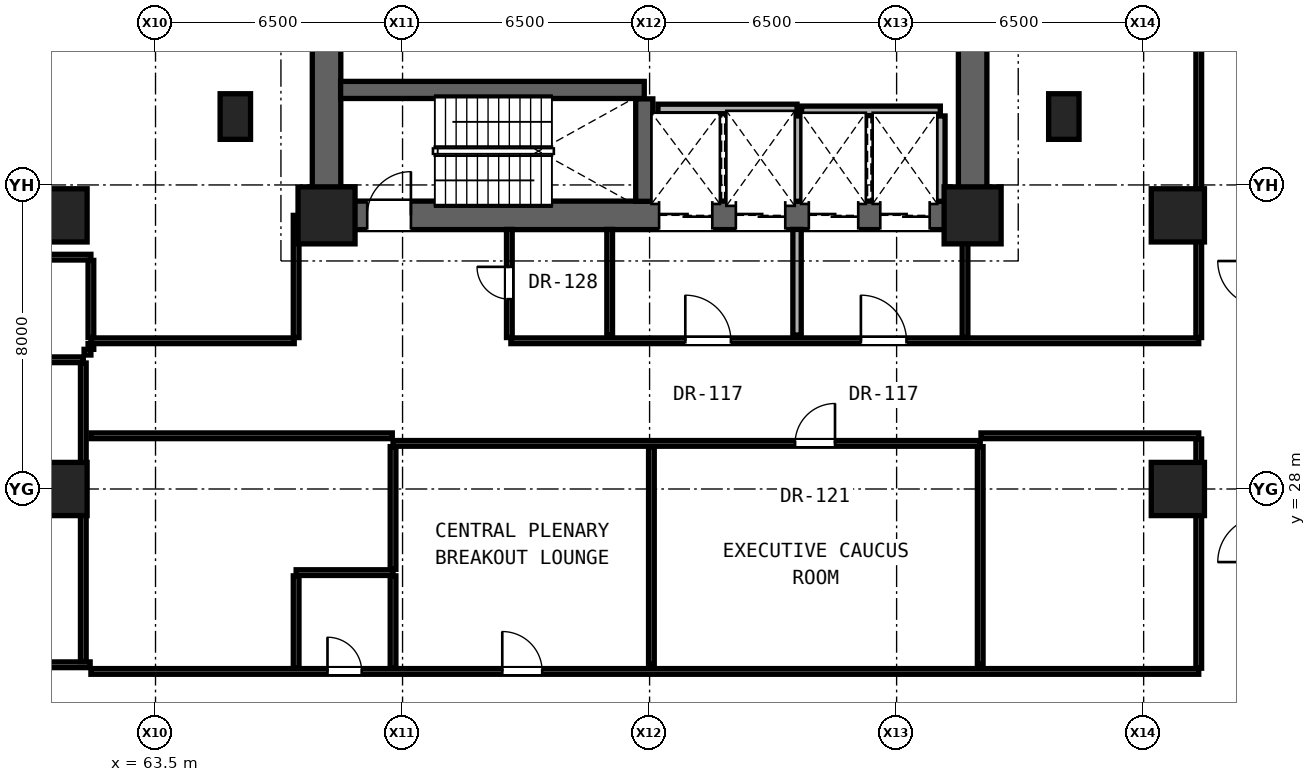
"""IFC4 building model, lengths in metres.
Left out: names, types, materials, properties, quantities, classifications, styles, units other than length and angle.
Written with IfcOpenShell. Run it as: python <this file> out.ifc"""

import sys

from ifc_helpers import new_model, si_unit, direction, frame, frame_2d, origin, origin_2d, place, context, subcontext, project, spatial, rectangle, hollow_rectangle, extrude, element, fill, save


model = new_model("IFC4")
c1 = context("Model", 3, precision=1e-05, world=origin(), true_north=direction((0.0, 1.0)))
c2 = subcontext(c1, "Body", "Model", "MODEL_VIEW")
j1 = project(units=[si_unit("LENGTHUNIT", "METRE"), si_unit("PLANEANGLEUNIT", "RADIAN")], contexts=[c1])
p1 = place(None, origin())
s1 = spatial("IfcSite", under=j1, at=p1, CompositionType="ELEMENT")
p2 = place(p1, origin())
s2 = spatial("IfcBuilding", under=s1, at=p2, CompositionType="ELEMENT")
p3 = place(p2, frame((0.0, 0.0, 13.8)))
s3 = spatial("IfcBuildingStorey", under=s2, at=p3, CompositionType="ELEMENT", Elevation=13.8)
for number, where, z_axis, x_axis in (
    (1, (68.0, 35.2, 0.0), (0.0, 0.0, 1.0), (1.0, 0.0, 0.0)),
    (2, (85.0, 35.2, 0.0), (0.0, 0.0, 1.0), (1.0, 0.0, 0.0)),
):
    element("IfcColumn", number, at=place(p3, frame(where, z_axis=z_axis, x_axis=x_axis)), inside=s3, PredefinedType="COLUMN", context=c2, shape_type="SweptSolid", body=[
        extrude(rectangle(XDim=1.5, YDim=1.5, at=origin_2d()), origin(), (0.0, 0.0, 1.0), 4.3),
    ])
for number, where, z_axis, x_axis in (
    (3, (61.0, 28.0, 0.0), (0.0, 0.0, 1.0), (1.0, 0.0, 0.0)),
    (4, (61.0, 35.2, 0.0), (0.0, 0.0, 1.0), (1.0, 0.0, 0.0)),
    (5, (90.4, 28.0, 0.0), (0.0, 0.0, 1.0), (1.0, 0.0, 0.0)),
    (6, (90.4, 35.2, 0.0), (0.0, 0.0, 1.0), (1.0, 0.0, 0.0)),
):
    element("IfcColumn", number, at=place(p3, frame(where, z_axis=z_axis, x_axis=x_axis)), inside=s3, PredefinedType="COLUMN", context=c2, shape_type="SweptSolid", body=[
        extrude(hollow_rectangle(XDim=1.4, YDim=1.4, WallThickness=0.08, at=origin_2d()), origin(), (0.0, 0.0, 1.0), 4.3),
    ])
for number, where, z_axis, x_axis in (
    (7, (65.6, 37.8, 0.0), (0.0, 0.0, 1.0), (1.0, 0.0, 0.0)),
    (8, (87.4, 37.8, 0.0), (0.0, 0.0, 1.0), (1.0, 0.0, 0.0)),
):
    element("IfcColumn", number, at=place(p3, frame(where, z_axis=z_axis, x_axis=x_axis)), inside=s3, PredefinedType="PILASTER", context=c2, shape_type="SweptSolid", body=[
        extrude(rectangle(XDim=0.8, YDim=1.2, at=origin_2d()), origin(), (0.0, 0.0, 1.0), 4.3),
    ])
for number, where, z_axis, x_axis in (
    (9, (68.0, 35.2, 0.0), (0.0, 0.0, 1.0), (0.0, 1.0, 0.0)),
    (10, (85.0, 35.2, 0.0), (0.0, 0.0, 1.0), (0.0, 1.0, 0.0)),
):
    element("IfcWall", number, at=place(p3, frame(where, z_axis=z_axis, x_axis=x_axis)), inside=s3, PredefinedType="SHEAR", context=c2, shape_type="SweptSolid", body=[
        extrude(rectangle(XDim=5.6, YDim=0.75, at=frame_2d((2.8, 0.0))), origin(), (0.0, 0.0, 1.0), 3.65),
    ])
p4 = place(p3, frame((68.0, 35.2, 0.0), z_axis=(0.0, 0.0, 1.0), x_axis=(1.0, 0.0, 0.0)))
e11 = element("IfcWall", 11, at=p4, inside=s3, PredefinedType="SHEAR", context=c2, shape_type="SweptSolid", body=[
    extrude(rectangle(XDim=17.0, YDim=0.75, at=frame_2d((8.5, 0.0))), origin(), (0.0, 0.0, 1.0), 3.65),
])
p5 = place(p4, frame((1.07, 0.0, 0.0)))
e12 = element("IfcOpeningElement", 12, at=p5, cuts=e11, PredefinedType="OPENING", context=c2, shape_type="SweptSolid", body=[
    extrude(rectangle(XDim=1.15, YDim=2.2, at=frame_2d((0.575, 1.1))), frame((0.0, 0.385, 0.0), z_axis=(0.0, -1.0, 0.0), x_axis=(1.0, 0.0, 0.0)), (0.0, 0.0, 1.0), 0.77),
])
p6 = place(p4, frame((8.75, 0.0, 0.0)))
e13 = element("IfcOpeningElement", 13, at=p6, cuts=e11, PredefinedType="OPENING", context=c2, shape_type="SweptSolid", body=[
    extrude(rectangle(XDim=1.4, YDim=2.35, at=frame_2d((0.7, 1.175))), frame((0.0, 0.385, 0.0), z_axis=(0.0, -1.0, 0.0), x_axis=(1.0, 0.0, 0.0)), (0.0, 0.0, 1.0), 0.77),
])
p7 = place(p4, frame((10.77, 0.0, 0.0)))
e14 = element("IfcOpeningElement", 14, at=p7, cuts=e11, PredefinedType="OPENING", context=c2, shape_type="SweptSolid", body=[
    extrude(rectangle(XDim=1.3, YDim=2.3, at=frame_2d((0.65, 1.15))), frame((0.0, 0.385, 0.0), z_axis=(0.0, -1.0, 0.0), x_axis=(1.0, 0.0, 0.0)), (0.0, 0.0, 1.0), 0.77),
])
p8 = place(p4, frame((12.69, 0.0, 0.0)))
e15 = element("IfcOpeningElement", 15, at=p8, cuts=e11, PredefinedType="OPENING", context=c2, shape_type="SweptSolid", body=[
    extrude(rectangle(XDim=1.3, YDim=2.3, at=frame_2d((0.65, 1.15))), frame((0.0, 0.385, 0.0), z_axis=(0.0, -1.0, 0.0), x_axis=(1.0, 0.0, 0.0)), (0.0, 0.0, 1.0), 0.77),
])
p9 = place(p4, frame((14.57, 0.0, 0.0)))
e16 = element("IfcOpeningElement", 16, at=p9, cuts=e11, PredefinedType="OPENING", context=c2, shape_type="SweptSolid", body=[
    extrude(rectangle(XDim=1.3, YDim=2.3, at=frame_2d((0.65, 1.15))), frame((0.0, 0.385, 0.0), z_axis=(0.0, -1.0, 0.0), x_axis=(1.0, 0.0, 0.0)), (0.0, 0.0, 1.0), 0.77),
])
p10 = place(p3, frame((61.8, 23.2, 0.0), z_axis=(0.0, 0.0, 1.0), x_axis=(1.0, 0.0, 0.0)))
e17 = element("IfcWall", 17, at=p10, inside=s3, PredefinedType="PARTITIONING", context=c2, shape_type="SweptSolid", body=[
    extrude(rectangle(XDim=29.15, YDim=0.15, at=frame_2d((14.575, 0.0))), origin(), (0.0, 0.0, 1.0), 2.715),
])
p11 = place(p10, frame((6.225, 0.0, 0.0)))
e18 = element("IfcOpeningElement", 18, at=p11, cuts=e17, PredefinedType="OPENING", context=c2, shape_type="SweptSolid", body=[
    extrude(rectangle(XDim=0.9, YDim=2.1, at=frame_2d((0.45, 1.05))), frame((0.0, 0.085, 0.0), z_axis=(0.0, -1.0, 0.0), x_axis=(1.0, 0.0, 0.0)), (0.0, 0.0, 1.0), 0.17),
])
p12 = place(p10, frame((10.824, 0.0, 0.0)))
e19 = element("IfcOpeningElement", 19, at=p12, cuts=e17, PredefinedType="OPENING", context=c2, shape_type="SweptSolid", body=[
    extrude(rectangle(XDim=1.05, YDim=2.2, at=frame_2d((0.525, 1.1))), frame((0.0, 0.085, 0.0), z_axis=(0.0, -1.0, 0.0), x_axis=(1.0, 0.0, 0.0)), (0.0, 0.0, 1.0), 0.17),
])
p13 = place(p3, frame((42.65, 23.375, 0.0), z_axis=(0.0, 0.0, 1.0), x_axis=(1.0, 0.0, 0.0)))
e20 = element("IfcWall", 20, at=p13, inside=s3, PredefinedType="PARTITIONING", context=c2, shape_type="SweptSolid", body=[
    extrude(rectangle(XDim=19.13, YDim=0.15, at=frame_2d((9.565, 0.0))), origin(), (0.0, 0.0, 1.0), 2.602),
])
p14 = place(p3, frame((67.2, 25.8, 0.0), z_axis=(0.0, 0.0, 1.0), x_axis=(1.0, 0.0, 0.0)))
e21 = element("IfcWall", 21, at=p14, inside=s3, PredefinedType="PARTITIONING", context=c2, shape_type="SweptSolid", body=[
    extrude(rectangle(XDim=2.55, YDim=0.15, at=frame_2d((1.275, 0.0))), origin(), (0.0, 0.0, 1.0), 2.715),
])
p15 = place(p3, frame((69.75, 29.2, 0.0), z_axis=(0.0, 0.0, 1.0), x_axis=(1.0, 0.0, 0.0)))
e22 = element("IfcWall", 22, at=p15, inside=s3, PredefinedType="PARTITIONING", context=c2, shape_type="SweptSolid", body=[
    extrude(rectangle(XDim=15.45, YDim=0.15, at=frame_2d((7.725, 0.0))), origin(), (0.0, 0.0, 1.0), 2.715),
])
p16 = place(p15, frame((10.579, 0.0, 0.0)))
e23 = element("IfcOpeningElement", 23, at=p16, cuts=e22, PredefinedType="OPENING", context=c2, shape_type="SweptSolid", body=[
    extrude(rectangle(XDim=1.05, YDim=2.2, at=frame_2d((0.525, 1.1))), frame((0.0, 0.085, 0.0), z_axis=(0.0, -1.0, 0.0), x_axis=(1.0, 0.0, 0.0)), (0.0, 0.0, 1.0), 0.17),
])
p17 = place(p3, frame((61.8, 29.4, 0.0), z_axis=(0.0, 0.0, 1.0), x_axis=(1.0, 0.0, 0.0)))
e24 = element("IfcWall", 24, at=p17, inside=s3, PredefinedType="PARTITIONING", context=c2, shape_type="SweptSolid", body=[
    extrude(rectangle(XDim=7.93, YDim=0.15, at=frame_2d((3.965, 0.0))), origin(), (0.0, 0.0, 1.0), 2.715),
])
p18 = place(p3, frame((85.22, 29.4, 0.0), z_axis=(0.0, 0.0, 1.0), x_axis=(1.0, 0.0, 0.0)))
e25 = element("IfcWall", 25, at=p18, inside=s3, PredefinedType="PARTITIONING", context=c2, shape_type="SweptSolid", body=[
    extrude(rectangle(XDim=5.73, YDim=0.15, at=frame_2d((2.865, 0.0))), origin(), (0.0, 0.0, 1.0), 2.786),
])
p19 = place(p3, frame((54.0, 31.4, 0.0), z_axis=(0.0, 0.0, 1.0), x_axis=(1.0, 0.0, 0.0)))
e26 = element("IfcWall", 26, at=p19, inside=s3, PredefinedType="PARTITIONING", context=c2, shape_type="SweptSolid", body=[
    extrude(rectangle(XDim=7.6, YDim=0.15, at=frame_2d((3.8, 0.0))), origin(), (0.0, 0.0, 1.0), 2.602),
])
p20 = place(p19, frame((3.2, 0.0, 0.0)))
e27 = element("IfcOpeningElement", 27, at=p20, cuts=e26, PredefinedType="OPENING", context=c2, shape_type="SweptSolid", body=[
    extrude(rectangle(XDim=1.2, YDim=2.25, at=frame_2d((0.6, 1.125))), frame((0.0, 0.085, 0.0), z_axis=(0.0, -1.0, 0.0), x_axis=(1.0, 0.0, 0.0)), (0.0, 0.0, 1.0), 0.17),
])
p21 = place(p3, frame((61.62, 31.6, 0.0), z_axis=(0.0, 0.0, 1.0), x_axis=(1.0, 0.0, 0.0)))
e28 = element("IfcWall", 28, at=p21, inside=s3, PredefinedType="PARTITIONING", context=c2, shape_type="SweptSolid", body=[
    extrude(rectangle(XDim=0.18, YDim=0.15, at=frame_2d((0.09, 0.0))), origin(), (0.0, 0.0, 1.0), 3.65),
])
p22 = place(p3, frame((61.8, 31.9, 0.0), z_axis=(0.0, 0.0, 1.0), x_axis=(1.0, 0.0, 0.0)))
e29 = element("IfcWall", 29, at=p22, inside=s3, PredefinedType="PARTITIONING", context=c2, shape_type="SweptSolid", body=[
    extrude(rectangle(XDim=5.35, YDim=0.15, at=frame_2d((2.675, 0.0))), origin(), (0.0, 0.0, 1.0), 3.65),
])
p23 = place(p3, frame((72.85, 31.9, 0.0), z_axis=(0.0, 0.0, 1.0), x_axis=(1.0, 0.0, 0.0)))
e30 = element("IfcWall", 30, at=p23, inside=s3, PredefinedType="PARTITIONING", context=c2, shape_type="SweptSolid", body=[
    extrude(rectangle(XDim=18.1, YDim=0.15, at=frame_2d((9.05, 0.0))), origin(), (0.0, 0.0, 1.0), 2.715),
])
p24 = place(p23, frame((9.21, 0.0, 0.0)))
e31 = element("IfcOpeningElement", 31, at=p24, cuts=e30, PredefinedType="OPENING", context=c2, shape_type="SweptSolid", body=[
    extrude(rectangle(XDim=1.2, YDim=2.25, at=frame_2d((0.6, 1.125))), frame((0.0, 0.085, 0.0), z_axis=(0.0, -1.0, 0.0), x_axis=(1.0, 0.0, 0.0)), (0.0, 0.0, 1.0), 0.17),
])
p25 = place(p23, frame((4.59, 0.0, 0.0)))
e32 = element("IfcOpeningElement", 32, at=p25, cuts=e30, PredefinedType="OPENING", context=c2, shape_type="SweptSolid", body=[
    extrude(rectangle(XDim=1.2, YDim=2.25, at=frame_2d((0.6, 1.125))), frame((0.0, 0.085, 0.0), z_axis=(0.0, -1.0, 0.0), x_axis=(1.0, 0.0, 0.0)), (0.0, 0.0, 1.0), 0.17),
])
p26 = place(p3, frame((40.4, 34.1, 0.0), z_axis=(0.0, 0.0, 1.0), x_axis=(1.0, 0.0, 0.0)))
e33 = element("IfcWall", 33, at=p26, inside=s3, PredefinedType="PARTITIONING", context=c2, shape_type="SweptSolid", body=[
    extrude(rectangle(XDim=21.4, YDim=0.15, at=frame_2d((10.7, 0.0))), origin(), (0.0, 0.0, 1.0), 2.602),
])
p27 = place(p3, frame((80.5, 37.95, 0.0), z_axis=(0.0, 0.0, 1.0), x_axis=(1.0, 0.0, 0.0)))
e34 = element("IfcWall", 34, at=p27, inside=s3, PredefinedType="SOLIDWALL", context=c2, shape_type="SweptSolid", body=[
    extrude(rectangle(XDim=3.65, YDim=0.25, at=frame_2d((1.825, 0.0))), origin(), (0.0, 0.0, 1.0), 3.65),
])
p28 = place(p3, frame((76.72, 38.0, 0.0), z_axis=(0.0, 0.0, 1.0), x_axis=(1.0, 0.0, 0.0)))
e35 = element("IfcWall", 35, at=p28, inside=s3, PredefinedType="SOLIDWALL", context=c2, shape_type="SweptSolid", body=[
    extrude(rectangle(XDim=3.66, YDim=0.25, at=frame_2d((1.83, 0.0))), origin(), (0.0, 0.0, 1.0), 3.65),
])
p29 = place(p3, frame((68.37, 38.5, 0.0), z_axis=(0.0, 0.0, 1.0), x_axis=(1.0, 0.0, 0.0)))
e36 = element("IfcWall", 36, at=p29, inside=s3, PredefinedType="SHEAR", context=c2, shape_type="SweptSolid", body=[
    extrude(rectangle(XDim=7.99, YDim=0.45, at=frame_2d((3.995, 0.0))), origin(), (0.0, 0.0, 1.0), 3.65),
])
p30 = place(p3, frame((61.6, 23.46, 0.0), z_axis=(0.0, 0.0, 1.0), x_axis=(0.0, 1.0, 0.0)))
e37 = element("IfcWall", 37, at=p30, inside=s3, PredefinedType="PARTITIONING", context=c2, shape_type="SweptSolid", body=[
    extrude(rectangle(XDim=7.855, YDim=0.15, at=frame_2d((3.927, 0.0))), origin(), (0.0, 0.0, 1.0), 2.869),
])
p31 = place(p3, frame((61.8, 31.675, 0.0), z_axis=(0.0, 0.0, 1.0), x_axis=(0.0, 1.0, 0.0)))
e38 = element("IfcWall", 38, at=p31, inside=s3, PredefinedType="PARTITIONING", context=c2, shape_type="SweptSolid", body=[
    extrude(rectangle(XDim=0.15, YDim=0.15, at=frame_2d((0.075, 0.0))), origin(), (0.0, 0.0, 1.0), 3.65),
])
p32 = place(p3, frame((61.8, 31.985, 0.0), z_axis=(0.0, 0.0, 1.0), x_axis=(0.0, 1.0, 0.0)))
e39 = element("IfcWall", 39, at=p32, inside=s3, PredefinedType="PARTITIONING", context=c2, shape_type="SweptSolid", body=[
    extrude(rectangle(XDim=2.03, YDim=0.15, at=frame_2d((1.015, 0.0))), origin(), (0.0, 0.0, 1.0), 3.65),
])
p33 = place(p3, frame((67.2, 23.285, 0.0), z_axis=(0.0, 0.0, 1.0), x_axis=(0.0, 1.0, 0.0)))
e40 = element("IfcWall", 40, at=p33, inside=s3, PredefinedType="PARTITIONING", context=c2, shape_type="SweptSolid", body=[
    extrude(rectangle(XDim=2.43, YDim=0.15, at=frame_2d((1.215, 0.0))), origin(), (0.0, 0.0, 1.0), 3.65),
])
p34 = place(p3, frame((67.2, 31.985, 0.0), z_axis=(0.0, 0.0, 1.0), x_axis=(0.0, 1.0, 0.0)))
e41 = element("IfcWall", 41, at=p34, inside=s3, PredefinedType="PARTITIONING", context=c2, shape_type="SweptSolid", body=[
    extrude(rectangle(XDim=3.215, YDim=0.15, at=frame_2d((1.607, 0.0))), origin(), (0.0, 0.0, 1.0), 2.542),
])
p35 = place(p3, frame((69.75, 23.285, 0.0), z_axis=(0.0, 0.0, 1.0), x_axis=(0.0, 1.0, 0.0)))
e42 = element("IfcWall", 42, at=p35, inside=s3, PredefinedType="PARTITIONING", context=c2, shape_type="SweptSolid", body=[
    extrude(rectangle(XDim=2.43, YDim=0.15, at=frame_2d((1.215, 0.0))), origin(), (0.0, 0.0, 1.0), 3.65),
])
p36 = place(p3, frame((69.75, 25.885, 0.0), z_axis=(0.0, 0.0, 1.0), x_axis=(0.0, 1.0, 0.0)))
e43 = element("IfcWall", 43, at=p36, inside=s3, PredefinedType="PARTITIONING", context=c2, shape_type="SweptSolid", body=[
    extrude(rectangle(XDim=3.23, YDim=0.15, at=frame_2d((1.615, 0.0))), origin(), (0.0, 0.0, 1.0), 2.715),
])
p37 = place(p3, frame((72.81, 31.985, 0.0), z_axis=(0.0, 0.0, 1.0), x_axis=(0.0, 1.0, 0.0)))
e44 = element("IfcWall", 44, at=p37, inside=s3, PredefinedType="PARTITIONING", context=c2, shape_type="SweptSolid", body=[
    extrude(rectangle(XDim=2.845, YDim=0.15, at=frame_2d((1.422, 0.0))), origin(), (0.0, 0.0, 1.0), 3.65),
])
p38 = place(p37, frame((1.01, 0.0, 0.0)))
e45 = element("IfcOpeningElement", 45, at=p38, cuts=e44, PredefinedType="OPENING", context=c2, shape_type="SweptSolid", body=[
    extrude(rectangle(XDim=0.85, YDim=2.01, at=frame_2d((0.425, 1.005))), frame((0.0, 0.085, 0.0), z_axis=(0.0, -1.0, 0.0), x_axis=(1.0, 0.0, 0.0)), (0.0, 0.0, 1.0), 0.17),
])
p39 = place(p3, frame((75.45, 32.05, 0.0), z_axis=(0.0, 0.0, 1.0), x_axis=(0.0, 1.0, 0.0)))
e46 = element("IfcWall", 46, at=p39, inside=s3, PredefinedType="PARTITIONING", context=c2, shape_type="SweptSolid", body=[
    extrude(rectangle(XDim=2.78, YDim=0.15, at=frame_2d((1.39, 0.0))), origin(), (0.0, 0.0, 1.0), 3.65),
])
p40 = place(p3, frame((76.36, 35.57, 0.0), z_axis=(0.0, 0.0, 1.0), x_axis=(0.0, 1.0, 0.0)))
e47 = element("IfcWall", 47, at=p40, inside=s3, PredefinedType="SHEAR", context=c2, shape_type="SweptSolid", body=[
    extrude(rectangle(XDim=2.695, YDim=0.45, at=frame_2d((1.347, 0.0))), origin(), (0.0, 0.0, 1.0), 3.65),
])
p41 = place(p3, frame((76.548, 23.4, 0.0), z_axis=(0.0, 0.0, 1.0), x_axis=(0.0, 1.0, 0.0)))
e48 = element("IfcWall", 48, at=p41, inside=s3, PredefinedType="PARTITIONING", context=c2, shape_type="SweptSolid", body=[
    extrude(rectangle(XDim=5.715, YDim=0.15, at=frame_2d((2.857, 0.0))), origin(), (0.0, 0.0, 1.0), 2.715),
])
p42 = place(p3, frame((80.38, 32.05, 0.0), z_axis=(0.0, 0.0, 1.0), x_axis=(0.0, 1.0, 0.0)))
e49 = element("IfcWall", 49, at=p42, inside=s3, PredefinedType="SOLIDWALL", context=c2, shape_type="SweptSolid", body=[
    extrude(rectangle(XDim=2.78, YDim=0.22, at=frame_2d((1.39, 0.0))), origin(), (0.0, 0.0, 1.0), 3.65),
])
for number, where, z_axis, x_axis in (
    (50, (80.38, 35.57, 0.0), (0.0, 0.0, 1.0), (0.0, 1.0, 0.0)),
    (51, (84.15, 35.57, 0.0), (0.0, 0.0, 1.0), (0.0, 1.0, 0.0)),
):
    element("IfcWall", number, at=place(p3, frame(where, z_axis=z_axis, x_axis=x_axis)), inside=s3, PredefinedType="SOLIDWALL", context=c2, shape_type="SweptSolid", body=[
        extrude(rectangle(XDim=2.245, YDim=0.25, at=frame_2d((1.123, 0.0))), origin(), (0.0, 0.0, 1.0), 3.65),
    ])
p43 = place(p3, frame((84.8, 31.985, 0.0), z_axis=(0.0, 0.0, 1.0), x_axis=(0.0, 1.0, 0.0)))
e52 = element("IfcWall", 52, at=p43, inside=s3, PredefinedType="PARTITIONING", context=c2, shape_type="SweptSolid", body=[
    extrude(rectangle(XDim=2.845, YDim=0.15, at=frame_2d((1.422, 0.0))), origin(), (0.0, 0.0, 1.0), 2.715),
])
p44 = place(p3, frame((85.2, 23.4, 0.0), z_axis=(0.0, 0.0, 1.0), x_axis=(0.0, 1.0, 0.0)))
e53 = element("IfcWall", 53, at=p44, inside=s3, PredefinedType="PARTITIONING", context=c2, shape_type="SweptSolid", body=[
    extrude(rectangle(XDim=5.715, YDim=0.15, at=frame_2d((2.857, 0.0))), origin(), (0.0, 0.0, 1.0), 2.715),
])
p45 = place(p3, frame((90.95, 23.285, 0.0), z_axis=(0.0, 0.0, 1.0), x_axis=(0.0, 1.0, 0.0)))
e54 = element("IfcWall", 54, at=p45, inside=s3, PredefinedType="PARTITIONING", context=c2, shape_type="SweptSolid", body=[
    extrude(rectangle(XDim=6.03, YDim=0.15, at=frame_2d((3.015, 0.0))), origin(), (0.0, 0.0, 1.0), 2.869),
])
p46 = place(p3, frame((90.95, 31.985, 0.0), z_axis=(0.0, 0.0, 1.0), x_axis=(0.0, 1.0, 0.0)))
e55 = element("IfcWall", 55, at=p46, inside=s3, PredefinedType="PARTITIONING", context=c2, shape_type="SweptSolid", body=[
    extrude(rectangle(XDim=14.13, YDim=0.15, at=frame_2d((7.065, 0.0))), origin(), (0.0, 0.0, 1.0), 2.786),
])
p47 = place(p24, origin())
e56 = element("IfcDoor", 56, at=p47, inside=s3, OperationType="SINGLE_SWING_LEFT", PredefinedType="DOOR", context=c2, shape_type="SweptSolid", body=[
    extrude(rectangle(XDim=1.2, YDim=2.25, at=frame_2d((0.6, 1.125))), frame((0.0, 0.025, 0.0), z_axis=(0.0, -1.0, 0.0), x_axis=(1.0, 0.0, 0.0)), (0.0, 0.0, 1.0), 0.05),
])
fill(e31, e56)
p48 = place(p5, origin())
e57 = element("IfcDoor", 57, at=p48, inside=s3, OperationType="SINGLE_SWING_RIGHT", PredefinedType="DOOR", context=c2, shape_type="SweptSolid", body=[
    extrude(rectangle(XDim=1.15, YDim=2.2, at=frame_2d((0.575, 1.1))), frame((0.0, 0.025, 0.0), z_axis=(0.0, -1.0, 0.0), x_axis=(1.0, 0.0, 0.0)), (0.0, 0.0, 1.0), 0.05),
])
fill(e12, e57)
p49 = place(p25, origin())
e58 = element("IfcDoor", 58, at=p49, inside=s3, OperationType="SINGLE_SWING_LEFT", PredefinedType="DOOR", context=c2, shape_type="SweptSolid", body=[
    extrude(rectangle(XDim=1.2, YDim=2.25, at=frame_2d((0.6, 1.125))), frame((0.0, 0.025, 0.0), z_axis=(0.0, -1.0, 0.0), x_axis=(1.0, 0.0, 0.0)), (0.0, 0.0, 1.0), 0.05),
])
fill(e32, e58)
p50 = place(p38, origin())
e59 = element("IfcDoor", 59, at=p50, inside=s3, OperationType="SINGLE_SWING_RIGHT", PredefinedType="DOOR", context=c2, shape_type="SweptSolid", body=[
    extrude(rectangle(XDim=0.85, YDim=2.01, at=frame_2d((0.425, 1.005))), frame((0.0, 0.025, 0.0), z_axis=(0.0, -1.0, 0.0), x_axis=(1.0, 0.0, 0.0)), (0.0, 0.0, 1.0), 0.05),
])
fill(e45, e59)
p51 = place(p11, origin())
e60 = element("IfcDoor", 60, at=p51, inside=s3, OperationType="SINGLE_SWING_LEFT", PredefinedType="DOOR", context=c2, shape_type="SweptSolid", body=[
    extrude(rectangle(XDim=0.9, YDim=2.1, at=frame_2d((0.45, 1.05))), frame((0.0, 0.025, 0.0), z_axis=(0.0, -1.0, 0.0), x_axis=(1.0, 0.0, 0.0)), (0.0, 0.0, 1.0), 0.05),
])
fill(e18, e60)
p52 = place(p12, origin())
e61 = element("IfcDoor", 61, at=p52, inside=s3, OperationType="SINGLE_SWING_LEFT", PredefinedType="DOOR", context=c2, shape_type="SweptSolid", body=[
    extrude(rectangle(XDim=1.05, YDim=2.2, at=frame_2d((0.525, 1.1))), frame((0.0, 0.025, 0.0), z_axis=(0.0, -1.0, 0.0), x_axis=(1.0, 0.0, 0.0)), (0.0, 0.0, 1.0), 0.05),
])
fill(e19, e61)
p53 = place(p16, origin())
e62 = element("IfcDoor", 62, at=p53, inside=s3, OperationType="SINGLE_SWING_RIGHT", PredefinedType="DOOR", context=c2, shape_type="SweptSolid", body=[
    extrude(rectangle(XDim=1.05, YDim=2.2, at=frame_2d((0.525, 1.1))), frame((0.0, 0.025, 0.0), z_axis=(0.0, -1.0, 0.0), x_axis=(1.0, 0.0, 0.0)), (0.0, 0.0, 1.0), 0.05),
])
fill(e23, e62)
p54 = place(p6, origin())
e63 = element("IfcDoor", 63, at=p54, inside=s3, OperationType="DOUBLE_DOOR_SLIDING", PredefinedType="DOOR", context=c2, shape_type="SweptSolid", body=[
    extrude(rectangle(XDim=1.4, YDim=2.35, at=frame_2d((0.7, 1.175))), frame((0.0, 0.025, 0.0), z_axis=(0.0, -1.0, 0.0), x_axis=(1.0, 0.0, 0.0)), (0.0, 0.0, 1.0), 0.05),
])
fill(e13, e63)
p55 = place(p7, origin())
e64 = element("IfcDoor", 64, at=p55, inside=s3, OperationType="DOUBLE_DOOR_SLIDING", PredefinedType="DOOR", context=c2, shape_type="SweptSolid", body=[
    extrude(rectangle(XDim=1.3, YDim=2.3, at=frame_2d((0.65, 1.15))), frame((0.0, 0.025, 0.0), z_axis=(0.0, -1.0, 0.0), x_axis=(1.0, 0.0, 0.0)), (0.0, 0.0, 1.0), 0.05),
])
fill(e14, e64)
p56 = place(p8, origin())
e65 = element("IfcDoor", 65, at=p56, inside=s3, OperationType="DOUBLE_DOOR_SLIDING", PredefinedType="DOOR", context=c2, shape_type="SweptSolid", body=[
    extrude(rectangle(XDim=1.3, YDim=2.3, at=frame_2d((0.65, 1.15))), frame((0.0, 0.025, 0.0), z_axis=(0.0, -1.0, 0.0), x_axis=(1.0, 0.0, 0.0)), (0.0, 0.0, 1.0), 0.05),
])
fill(e15, e65)
p57 = place(p9, origin())
e66 = element("IfcDoor", 66, at=p57, inside=s3, OperationType="DOUBLE_DOOR_SLIDING", PredefinedType="DOOR", context=c2, shape_type="SweptSolid", body=[
    extrude(rectangle(XDim=1.3, YDim=2.3, at=frame_2d((0.65, 1.15))), frame((0.0, 0.025, 0.0), z_axis=(0.0, -1.0, 0.0), x_axis=(1.0, 0.0, 0.0)), (0.0, 0.0, 1.0), 0.05),
])
fill(e16, e66)
save(model, sys.argv[1])
